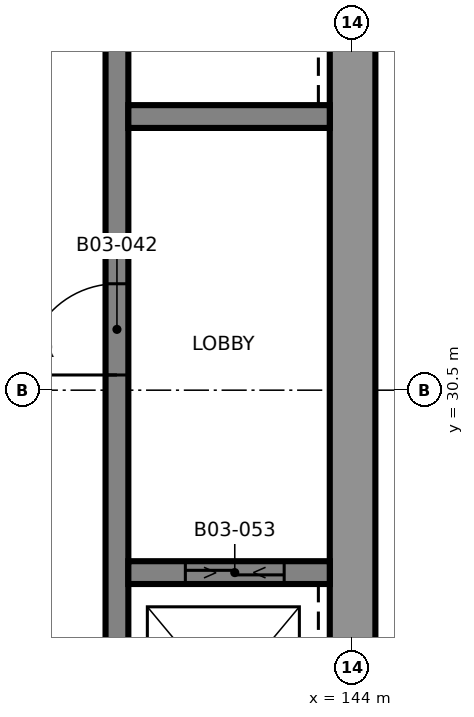
"""IFC4 building model, lengths in metres.
Left out: names, types, materials, properties, quantities, classifications, styles, units other than length and angle.
Written with IfcOpenShell. Run it as: python <this file> out.ifc"""

import sys

from ifc_helpers import new_model, si_unit, direction, frame, frame_2d, origin, place, context, subcontext, project, spatial, rectangle, extrude, element, fill, save


model = new_model("IFC4")
c1 = context("Model", 3, precision=1e-05, world=origin(), true_north=direction((0.0, 1.0)))
c2 = subcontext(c1, "Body", "Model", "MODEL_VIEW")
j1 = project(units=[si_unit("LENGTHUNIT", "METRE"), si_unit("PLANEANGLEUNIT", "RADIAN")], contexts=[c1])
p1 = place(None, origin())
s1 = spatial("IfcSite", under=j1, at=p1, CompositionType="ELEMENT")
p2 = place(p1, origin())
s2 = spatial("IfcBuilding", under=s1, at=p2, CompositionType="ELEMENT")
p3 = place(p2, frame((0.0, 0.0, 55.7)))
s3 = spatial("IfcBuildingStorey", under=s2, at=p3, CompositionType="ELEMENT", Elevation=55.7)
p4 = place(p3, frame((144.0, 24.2, 0.0), z_axis=(0.0, 0.0, 1.0), x_axis=(0.0, 1.0, 0.0)))
e1 = element("IfcWall", 1, at=p4, inside=s3, PredefinedType="SHEAR", context=c2, shape_type="SweptSolid", body=[
    extrude(rectangle(XDim=13.6, YDim=0.6, at=frame_2d((6.8, 0.0))), origin(), (0.0, 0.0, 1.0), 3.7),
])
p5 = place(p3, frame((140.9, 24.8, 0.0), z_axis=(0.0, 0.0, 1.0), x_axis=(0.0, 1.0, 0.0)))
e2 = element("IfcWall", 2, at=p5, inside=s3, PredefinedType="SHEAR", context=c2, shape_type="SweptSolid", body=[
    extrude(rectangle(XDim=12.4, YDim=0.3, at=frame_2d((6.2, 0.0))), origin(), (0.0, 0.0, 1.0), 3.7),
])
p6 = place(p5, frame((5.9, 0.0, 0.0)))
e3 = element("IfcOpeningElement", 3, at=p6, cuts=e2, PredefinedType="OPENING", context=c2, shape_type="SweptSolid", body=[
    extrude(rectangle(XDim=1.2, YDim=2.1, at=frame_2d((0.6, 1.05))), frame((0.0, 0.16, 0.0), z_axis=(0.0, -1.0, 0.0), x_axis=(1.0, 0.0, 0.0)), (0.0, 0.0, 1.0), 0.32),
])
p7 = place(p3, frame((141.05, 28.1, 0.0), z_axis=(0.0, 0.0, 1.0), x_axis=(1.0, 0.0, 0.0)))
e4 = element("IfcWall", 4, at=p7, inside=s3, PredefinedType="SHEAR", context=c2, shape_type="SweptSolid", body=[
    extrude(rectangle(XDim=2.65, YDim=0.3, at=frame_2d((1.325, 0.0))), origin(), (0.0, 0.0, 1.0), 3.7),
])
p8 = place(p7, frame((0.75, 0.0, 0.0)))
e5 = element("IfcOpeningElement", 5, at=p8, cuts=e4, PredefinedType="OPENING", context=c2, shape_type="SweptSolid", body=[
    extrude(rectangle(XDim=1.3, YDim=2.4, at=frame_2d((0.65, 1.2))), frame((0.0, 0.16, 0.0), z_axis=(0.0, -1.0, 0.0), x_axis=(1.0, 0.0, 0.0)), (0.0, 0.0, 1.0), 0.32),
])
p9 = place(p3, frame((141.05, 34.1, 0.0), z_axis=(0.0, 0.0, 1.0), x_axis=(1.0, 0.0, 0.0)))
e6 = element("IfcWall", 6, at=p9, inside=s3, PredefinedType="SHEAR", context=c2, shape_type="SweptSolid", body=[
    extrude(rectangle(XDim=2.65, YDim=0.3, at=frame_2d((1.325, 0.0))), origin(), (0.0, 0.0, 1.0), 3.7),
])
p10 = place(p6, origin())
e7 = element("IfcDoor", 7, at=p10, inside=s3, OperationType="SINGLE_SWING_RIGHT", PredefinedType="DOOR", context=c2, shape_type="SweptSolid", body=[
    extrude(rectangle(XDim=1.2, YDim=2.1, at=frame_2d((0.6, 1.05))), frame((0.0, 0.025, 0.0), z_axis=(0.0, -1.0, 0.0), x_axis=(1.0, 0.0, 0.0)), (0.0, 0.0, 1.0), 0.05),
])
fill(e3, e7)
p11 = place(p8, origin())
e8 = element("IfcDoor", 8, at=p11, inside=s3, OperationType="SLIDING_TO_LEFT", PredefinedType="DOOR", context=c2, shape_type="SweptSolid", body=[
    extrude(rectangle(XDim=1.3, YDim=2.4, at=frame_2d((0.65, 1.2))), frame((0.0, 0.025, 0.0), z_axis=(0.0, -1.0, 0.0), x_axis=(1.0, 0.0, 0.0)), (0.0, 0.0, 1.0), 0.05),
])
fill(e5, e8)
save(model, sys.argv[1])
